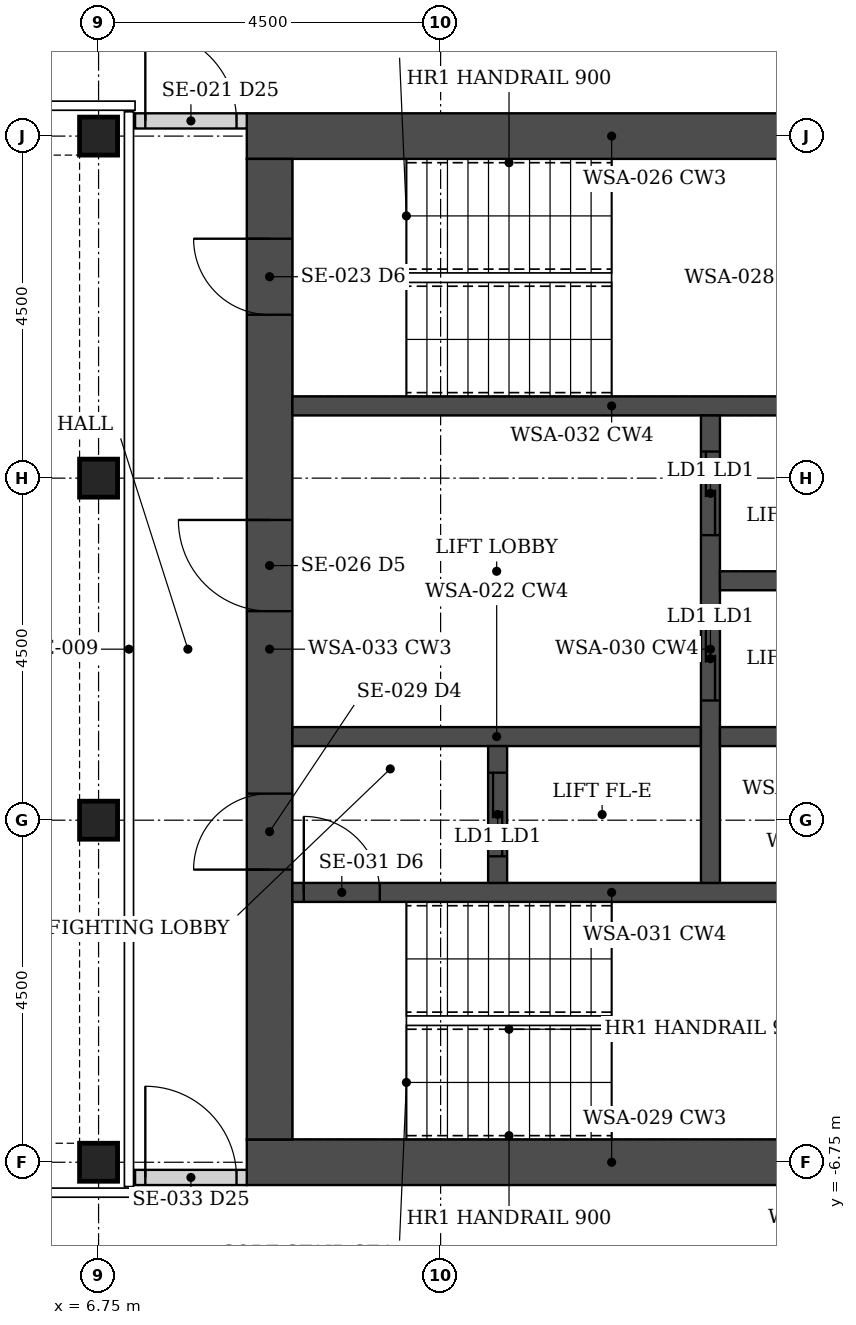
"""IFC4 building model, lengths in metres.
Left out: names, types, materials, properties, quantities, classifications, styles, units other than length and angle.
Written with IfcOpenShell. Run it as: python <this file> out.ifc"""

import sys

from ifc_helpers import new_model, si_unit, direction, frame, frame_2d, origin, origin_2d, place, context, subcontext, project, spatial, rectangle, hollow_rectangle, extrude, element, fill, save


model = new_model("IFC4")
c1 = context("Model", 3, precision=1e-05, world=origin(), true_north=direction((0.0, 1.0)))
c2 = subcontext(c1, "Body", "Model", "MODEL_VIEW")
j1 = project(units=[si_unit("LENGTHUNIT", "METRE"), si_unit("PLANEANGLEUNIT", "RADIAN")], contexts=[c1])
p1 = place(None, origin())
s1 = spatial("IfcSite", under=j1, at=p1, CompositionType="ELEMENT")
p2 = place(p1, origin())
s2 = spatial("IfcBuilding", under=s1, at=p2, CompositionType="ELEMENT")
p3 = place(p2, frame((0.0, 0.0, 253.3)))
s3 = spatial("IfcBuildingStorey", under=s2, at=p3, CompositionType="ELEMENT", Elevation=253.3)
for number, where, z_axis, x_axis in (
    (1, (6.75, -6.75, 0.0), (0.0, 0.0, 1.0), (1.0, 0.0, 0.0)),
    (2, (6.75, -2.25, 0.0), (0.0, 0.0, 1.0), (1.0, 0.0, 0.0)),
    (3, (6.75, 2.25, 0.0), (0.0, 0.0, 1.0), (1.0, 0.0, 0.0)),
    (4, (6.75, 6.75, 0.0), (0.0, 0.0, 1.0), (1.0, 0.0, 0.0)),
):
    element("IfcColumn", number, at=place(p3, frame(where, z_axis=z_axis, x_axis=x_axis)), inside=s3, PredefinedType="COLUMN", context=c2, shape_type="SweptSolid", body=[
        extrude(hollow_rectangle(XDim=0.5, YDim=0.5, WallThickness=0.025, at=origin_2d()), origin(), (0.0, 0.0, 1.0), 3.75),
    ])
for number, where, z_axis, x_axis in (
    (5, (8.7, -6.75, 0.0), (0.0, 0.0, 1.0), (1.0, 0.0, 0.0)),
    (6, (8.7, 6.75, 0.0), (0.0, 0.0, 1.0), (1.0, 0.0, 0.0)),
):
    element("IfcWall", number, at=place(p3, frame(where, z_axis=z_axis, x_axis=x_axis)), inside=s3, PredefinedType="SHEAR", context=c2, shape_type="SweptSolid", body=[
        extrude(rectangle(XDim=9.6, YDim=0.6, at=frame_2d((4.8, 0.0))), origin(), (0.0, 0.0, 1.0), 3.75),
    ])
p4 = place(p3, frame((9.0, -6.45, 0.0), z_axis=(0.0, 0.0, 1.0), x_axis=(0.0, 1.0, 0.0)))
e7 = element("IfcWall", 7, at=p4, inside=s3, PredefinedType="SHEAR", context=c2, shape_type="SweptSolid", body=[
    extrude(rectangle(XDim=12.9, YDim=0.6, at=frame_2d((6.45, 0.0))), origin(), (0.0, 0.0, 1.0), 3.75),
])
p5 = place(p4, frame((3.55, 0.0, 0.0)))
e8 = element("IfcOpeningElement", 8, at=p5, cuts=e7, PredefinedType="OPENING", context=c2, shape_type="SweptSolid", body=[
    extrude(rectangle(XDim=1.0, YDim=2.1, at=frame_2d((0.5, 1.05))), frame((0.0, 0.31, 0.0), z_axis=(0.0, -1.0, 0.0), x_axis=(1.0, 0.0, 0.0)), (0.0, 0.0, 1.0), 0.62),
])
p6 = place(p4, frame((6.95, 0.0, 0.0)))
e9 = element("IfcOpeningElement", 9, at=p6, cuts=e7, PredefinedType="OPENING", context=c2, shape_type="SweptSolid", body=[
    extrude(rectangle(XDim=1.2, YDim=2.1, at=frame_2d((0.6, 1.05))), frame((0.0, 0.31, 0.0), z_axis=(0.0, -1.0, 0.0), x_axis=(1.0, 0.0, 0.0)), (0.0, 0.0, 1.0), 0.62),
])
p7 = place(p4, frame((10.85, 0.0, 0.0)))
e10 = element("IfcOpeningElement", 10, at=p7, cuts=e7, PredefinedType="OPENING", context=c2, shape_type="SweptSolid", body=[
    extrude(rectangle(XDim=1.0, YDim=2.1, at=frame_2d((0.5, 1.05))), frame((0.0, 0.31, 0.0), z_axis=(0.0, -1.0, 0.0), x_axis=(1.0, 0.0, 0.0)), (0.0, 0.0, 1.0), 0.62),
])
p8 = place(p3, frame((9.3, -3.2, 0.0), z_axis=(0.0, 0.0, 1.0), x_axis=(1.0, 0.0, 0.0)))
e11 = element("IfcWall", 11, at=p8, inside=s3, PredefinedType="SHEAR", context=c2, shape_type="SweptSolid", body=[
    extrude(rectangle(XDim=8.4, YDim=0.25, at=frame_2d((4.2, 0.0))), origin(), (0.0, 0.0, 1.0), 3.75),
])
p9 = place(p8, frame((0.15, 0.0, 0.0)))
e12 = element("IfcOpeningElement", 12, at=p9, cuts=e11, PredefinedType="OPENING", context=c2, shape_type="SweptSolid", body=[
    extrude(rectangle(XDim=1.0, YDim=2.1, at=frame_2d((0.5, 1.05))), frame((0.0, 0.135, 0.0), z_axis=(0.0, -1.0, 0.0), x_axis=(1.0, 0.0, 0.0)), (0.0, 0.0, 1.0), 0.27),
])
p10 = place(p3, frame((9.3, 3.2, 0.0), z_axis=(0.0, 0.0, 1.0), x_axis=(1.0, 0.0, 0.0)))
e13 = element("IfcWall", 13, at=p10, inside=s3, PredefinedType="SHEAR", context=c2, shape_type="SweptSolid", body=[
    extrude(rectangle(XDim=8.4, YDim=0.25, at=frame_2d((4.2, 0.0))), origin(), (0.0, 0.0, 1.0), 3.75),
])
p11 = place(p3, frame((9.3, -1.15, 0.0), z_axis=(0.0, 0.0, 1.0), x_axis=(1.0, 0.0, 0.0)))
e14 = element("IfcWall", 14, at=p11, inside=s3, PredefinedType="SHEAR", context=c2, shape_type="SweptSolid", body=[
    extrude(rectangle(XDim=5.375, YDim=0.25, at=frame_2d((2.688, 0.0))), origin(), (0.0, 0.0, 1.0), 3.75),
])
p12 = place(p3, frame((12.0, -3.075, 0.0), z_axis=(0.0, 0.0, 1.0), x_axis=(0.0, 1.0, 0.0)))
e15 = element("IfcWall", 15, at=p12, inside=s3, PredefinedType="SHEAR", context=c2, shape_type="SweptSolid", body=[
    extrude(rectangle(XDim=1.8, YDim=0.25, at=frame_2d((0.9, 0.0))), origin(), (0.0, 0.0, 1.0), 3.75),
])
p13 = place(p12, frame((0.35, 0.0, 0.0)))
e16 = element("IfcOpeningElement", 16, at=p13, cuts=e15, PredefinedType="OPENING", context=c2, shape_type="SweptSolid", body=[
    extrude(rectangle(XDim=1.1, YDim=2.1, at=frame_2d((0.55, 1.05))), frame((0.0, 0.135, 0.0), z_axis=(0.0, -1.0, 0.0), x_axis=(1.0, 0.0, 0.0)), (0.0, 0.0, 1.0), 0.27),
])
p14 = place(p3, frame((14.8, -3.075, 0.0), z_axis=(0.0, 0.0, 1.0), x_axis=(0.0, 1.0, 0.0)))
e17 = element("IfcWall", 17, at=p14, inside=s3, PredefinedType="SHEAR", context=c2, shape_type="SweptSolid", body=[
    extrude(rectangle(XDim=6.15, YDim=0.25, at=frame_2d((3.075, 0.0))), origin(), (0.0, 0.0, 1.0), 3.75),
])
p15 = place(p14, frame((2.4, 0.0, 0.0)))
e18 = element("IfcOpeningElement", 18, at=p15, cuts=e17, PredefinedType="OPENING", context=c2, shape_type="SweptSolid", body=[
    extrude(rectangle(XDim=1.1, YDim=2.1, at=frame_2d((0.55, 1.05))), frame((0.0, 0.135, 0.0), z_axis=(0.0, -1.0, 0.0), x_axis=(1.0, 0.0, 0.0)), (0.0, 0.0, 1.0), 0.27),
])
p16 = place(p14, frame((4.575, 0.0, 0.0)))
e19 = element("IfcOpeningElement", 19, at=p16, cuts=e17, PredefinedType="OPENING", context=c2, shape_type="SweptSolid", body=[
    extrude(rectangle(XDim=1.1, YDim=2.1, at=frame_2d((0.55, 1.05))), frame((0.0, 0.135, 0.0), z_axis=(0.0, -1.0, 0.0), x_axis=(1.0, 0.0, 0.0)), (0.0, 0.0, 1.0), 0.27),
])
for number, where, z_axis, x_axis in (
    (20, (14.925, -1.15, 0.0), (0.0, 0.0, 1.0), (1.0, 0.0, 0.0)),
    (21, (14.925, 0.9, 0.0), (0.0, 0.0, 1.0), (1.0, 0.0, 0.0)),
):
    element("IfcWall", number, at=place(p3, frame(where, z_axis=z_axis, x_axis=x_axis)), inside=s3, PredefinedType="SHEAR", context=c2, shape_type="SweptSolid", body=[
        extrude(rectangle(XDim=2.775, YDim=0.25, at=frame_2d((1.387, 0.0))), origin(), (0.0, 0.0, 1.0), 3.75),
    ])
p17 = place(p3, frame((7.23, 6.95, 0.0), z_axis=(0.0, 0.0, 1.0), x_axis=(1.0, 0.0, 0.0)))
e22 = element("IfcWall", 22, at=p17, inside=s3, PredefinedType="PARTITIONING", context=c2, shape_type="SweptSolid", body=[
    extrude(rectangle(XDim=1.47, YDim=0.2, at=frame_2d((0.735, 0.0))), origin(), (0.0, 0.0, 1.0), 2.573),
])
p18 = place(p17, frame((0.135, 0.0, 0.0)))
e23 = element("IfcOpeningElement", 23, at=p18, cuts=e22, PredefinedType="OPENING", context=c2, shape_type="SweptSolid", body=[
    extrude(rectangle(XDim=1.2, YDim=2.1, at=frame_2d((0.6, 1.05))), frame((0.0, 0.11, 0.0), z_axis=(0.0, -1.0, 0.0), x_axis=(1.0, 0.0, 0.0)), (0.0, 0.0, 1.0), 0.22),
])
p19 = place(p3, frame((7.23, -6.95, 0.0), z_axis=(0.0, 0.0, 1.0), x_axis=(1.0, 0.0, 0.0)))
e24 = element("IfcWall", 24, at=p19, inside=s3, PredefinedType="PARTITIONING", context=c2, shape_type="SweptSolid", body=[
    extrude(rectangle(XDim=1.47, YDim=0.2, at=frame_2d((0.735, 0.0))), origin(), (0.0, 0.0, 1.0), 2.573),
])
p20 = place(p19, frame((0.135, 0.0, 0.0)))
e25 = element("IfcOpeningElement", 25, at=p20, cuts=e24, PredefinedType="OPENING", context=c2, shape_type="SweptSolid", body=[
    extrude(rectangle(XDim=1.2, YDim=2.1, at=frame_2d((0.6, 1.05))), frame((0.0, 0.11, 0.0), z_axis=(0.0, -1.0, 0.0), x_axis=(1.0, 0.0, 0.0)), (0.0, 0.0, 1.0), 0.22),
])
p21 = place(p18, origin())
e26 = element("IfcDoor", 26, at=p21, inside=s3, OperationType="DOUBLE_DOOR_DOUBLE_SWING", PredefinedType="DOOR", context=c2, shape_type="SweptSolid", body=[
    extrude(rectangle(XDim=1.2, YDim=2.1, at=frame_2d((0.6, 1.05))), frame((0.0, 0.025, 0.0), z_axis=(0.0, -1.0, 0.0), x_axis=(1.0, 0.0, 0.0)), (0.0, 0.0, 1.0), 0.05),
])
fill(e23, e26)
p22 = place(p20, origin())
e27 = element("IfcDoor", 27, at=p22, inside=s3, OperationType="DOUBLE_DOOR_DOUBLE_SWING", PredefinedType="DOOR", context=c2, shape_type="SweptSolid", body=[
    extrude(rectangle(XDim=1.2, YDim=2.1, at=frame_2d((0.6, 1.05))), frame((0.0, 0.025, 0.0), z_axis=(0.0, -1.0, 0.0), x_axis=(1.0, 0.0, 0.0)), (0.0, 0.0, 1.0), 0.05),
])
fill(e25, e27)
p23 = place(p5, origin())
e28 = element("IfcDoor", 28, at=p23, inside=s3, OperationType="SINGLE_SWING_LEFT", PredefinedType="DOOR", context=c2, shape_type="SweptSolid", body=[
    extrude(rectangle(XDim=1.0, YDim=2.1, at=frame_2d((0.5, 1.05))), frame((0.0, 0.025, 0.0), z_axis=(0.0, -1.0, 0.0), x_axis=(1.0, 0.0, 0.0)), (0.0, 0.0, 1.0), 0.05),
])
fill(e8, e28)
p24 = place(p9, origin())
e29 = element("IfcDoor", 29, at=p24, inside=s3, OperationType="SINGLE_SWING_LEFT", PredefinedType="DOOR", context=c2, shape_type="SweptSolid", body=[
    extrude(rectangle(XDim=1.0, YDim=2.1, at=frame_2d((0.5, 1.05))), frame((0.0, 0.025, 0.0), z_axis=(0.0, -1.0, 0.0), x_axis=(1.0, 0.0, 0.0)), (0.0, 0.0, 1.0), 0.05),
])
fill(e12, e29)
p25 = place(p6, origin())
e30 = element("IfcDoor", 30, at=p25, inside=s3, OperationType="SINGLE_SWING_RIGHT", PredefinedType="DOOR", context=c2, shape_type="SweptSolid", body=[
    extrude(rectangle(XDim=1.2, YDim=2.1, at=frame_2d((0.6, 1.05))), frame((0.0, 0.025, 0.0), z_axis=(0.0, -1.0, 0.0), x_axis=(1.0, 0.0, 0.0)), (0.0, 0.0, 1.0), 0.05),
])
fill(e9, e30)
p26 = place(p7, origin())
e31 = element("IfcDoor", 31, at=p26, inside=s3, OperationType="SINGLE_SWING_RIGHT", PredefinedType="DOOR", context=c2, shape_type="SweptSolid", body=[
    extrude(rectangle(XDim=1.0, YDim=2.1, at=frame_2d((0.5, 1.05))), frame((0.0, 0.025, 0.0), z_axis=(0.0, -1.0, 0.0), x_axis=(1.0, 0.0, 0.0)), (0.0, 0.0, 1.0), 0.05),
])
fill(e10, e31)
p27 = place(p13, origin())
e32 = element("IfcDoor", 32, at=p27, inside=s3, OperationType="DOUBLE_DOOR_SLIDING", PredefinedType="DOOR", context=c2, shape_type="SweptSolid", body=[
    extrude(rectangle(XDim=1.1, YDim=2.1, at=frame_2d((0.55, 1.05))), frame((0.0, 0.025, 0.0), z_axis=(0.0, -1.0, 0.0), x_axis=(1.0, 0.0, 0.0)), (0.0, 0.0, 1.0), 0.05),
])
fill(e16, e32)
p28 = place(p15, origin())
e33 = element("IfcDoor", 33, at=p28, inside=s3, OperationType="DOUBLE_DOOR_SLIDING", PredefinedType="DOOR", context=c2, shape_type="SweptSolid", body=[
    extrude(rectangle(XDim=1.1, YDim=2.1, at=frame_2d((0.55, 1.05))), frame((0.0, 0.025, 0.0), z_axis=(0.0, -1.0, 0.0), x_axis=(1.0, 0.0, 0.0)), (0.0, 0.0, 1.0), 0.05),
])
fill(e18, e33)
p29 = place(p16, origin())
e34 = element("IfcDoor", 34, at=p29, inside=s3, OperationType="DOUBLE_DOOR_SLIDING", PredefinedType="DOOR", context=c2, shape_type="SweptSolid", body=[
    extrude(rectangle(XDim=1.1, YDim=2.1, at=frame_2d((0.55, 1.05))), frame((0.0, 0.025, 0.0), z_axis=(0.0, -1.0, 0.0), x_axis=(1.0, 0.0, 0.0)), (0.0, 0.0, 1.0), 0.05),
])
fill(e19, e34)
save(model, sys.argv[1])
